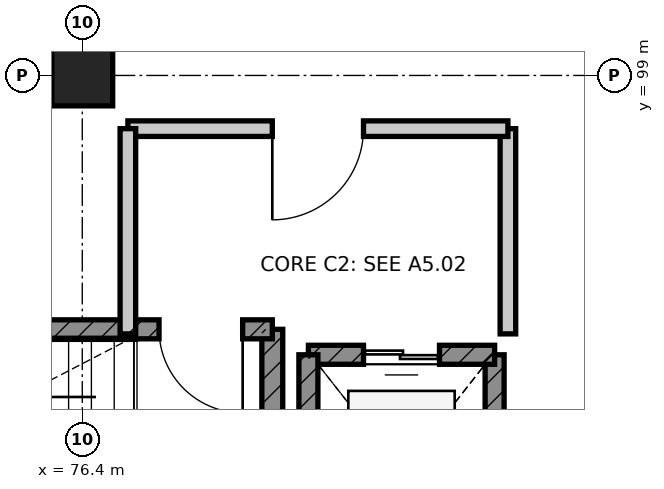
"""IFC4 building model, lengths in metres.
Left out: names, types, materials, properties, quantities, classifications, styles, units other than length and angle.
Written with IfcOpenShell. Run it as: python <this file> out.ifc"""

import sys

from ifc_helpers import new_model, si_unit, direction, frame, frame_2d, origin, origin_2d, place, context, subcontext, project, spatial, rectangle, extrude, element, fill, save


model = new_model("IFC4")
c1 = context("Model", 3, precision=1e-05, world=origin(), true_north=direction((0.0, 1.0)))
c2 = subcontext(c1, "Body", "Model", "MODEL_VIEW")
j1 = project(units=[si_unit("LENGTHUNIT", "METRE"), si_unit("PLANEANGLEUNIT", "RADIAN")], contexts=[c1])
p1 = place(None, origin())
s1 = spatial("IfcSite", under=j1, at=p1, CompositionType="ELEMENT")
p2 = place(p1, origin())
s2 = spatial("IfcBuilding", under=s1, at=p2, CompositionType="ELEMENT")
p3 = place(p2, frame((0.0, 0.0, 10.5)))
s3 = spatial("IfcBuildingStorey", under=s2, at=p3, CompositionType="ELEMENT", Elevation=10.5)
p4 = place(p3, frame((76.4, 99.0, 0.0), z_axis=(0.0, 0.0, 1.0), x_axis=(1.0, 0.0, 0.0)))
e1 = element("IfcColumn", 1, at=p4, inside=s3, PredefinedType="COLUMN", context=c2, shape_type="SweptSolid", body=[
    extrude(rectangle(XDim=0.8, YDim=0.8, at=origin_2d()), origin(), (0.0, 0.0, 1.0), 4.5),
])
p5 = place(p3, frame((78.9, 92.1, 0.0), z_axis=(0.0, 0.0, 1.0), x_axis=(0.0, 1.0, 0.0)))
e2 = element("IfcWall", 2, at=p5, inside=s3, PredefinedType="SHEAR", context=c2, shape_type="SweptSolid", body=[
    extrude(rectangle(XDim=3.56, YDim=0.275, at=frame_2d((1.78, 0.0))), origin(), (0.0, 0.0, 1.0), 4.22),
])
p6 = place(p3, frame((78.9, 95.66, 0.0), z_axis=(0.0, 0.0, 1.0), x_axis=(-1.0, 0.0, 0.0)))
e3 = element("IfcWall", 3, at=p6, inside=s3, PredefinedType="SHEAR", context=c2, shape_type="SweptSolid", body=[
    extrude(rectangle(XDim=8.4, YDim=0.25, at=frame_2d((4.2, 0.0))), origin(), (0.0, 0.0, 1.0), 4.22),
])
p7 = place(p6, frame((0.39, 0.0, 0.0)))
e4 = element("IfcOpeningElement", 4, at=p7, cuts=e3, PredefinedType="OPENING", context=c2, shape_type="SweptSolid", body=[
    extrude(rectangle(XDim=1.1, YDim=2.1, at=frame_2d((0.55, 1.05))), frame((0.0, 0.135, 0.0), z_axis=(0.0, -1.0, 0.0), x_axis=(1.0, 0.0, 0.0)), (0.0, 0.0, 1.0), 0.27),
])
p8 = place(p3, frame((81.825, 92.275, 0.0), z_axis=(0.0, 0.0, 1.0), x_axis=(0.0, 1.0, 0.0)))
e5 = element("IfcWall", 5, at=p8, inside=s3, PredefinedType="SHEAR", context=c2, shape_type="SweptSolid", body=[
    extrude(rectangle(XDim=3.05, YDim=0.25, at=frame_2d((1.525, 0.0))), origin(), (0.0, 0.0, 1.0), 4.22),
])
p9 = place(p3, frame((81.825, 95.325, 0.0), z_axis=(0.0, 0.0, 1.0), x_axis=(-1.0, 0.0, 0.0)))
e6 = element("IfcWall", 6, at=p9, inside=s3, PredefinedType="SHEAR", context=c2, shape_type="SweptSolid", body=[
    extrude(rectangle(XDim=2.45, YDim=0.25, at=frame_2d((1.225, 0.0))), origin(), (0.0, 0.0, 1.0), 4.22),
])
p10 = place(p9, frame((0.725, 0.0, 0.0)))
e7 = element("IfcOpeningElement", 7, at=p10, cuts=e6, PredefinedType="OPENING", context=c2, shape_type="SweptSolid", body=[
    extrude(rectangle(XDim=1.0, YDim=2.15, at=frame_2d((0.5, 1.075))), frame((0.0, 0.135, 0.0), z_axis=(0.0, -1.0, 0.0), x_axis=(1.0, 0.0, 0.0)), (0.0, 0.0, 1.0), 0.27),
])
p11 = place(p3, frame((79.375, 95.325, 0.0), z_axis=(0.0, 0.0, 1.0), x_axis=(0.0, -1.0, 0.0)))
e8 = element("IfcWall", 8, at=p11, inside=s3, PredefinedType="SHEAR", context=c2, shape_type="SweptSolid", body=[
    extrude(rectangle(XDim=3.05, YDim=0.25, at=frame_2d((1.525, 0.0))), origin(), (0.0, 0.0, 1.0), 4.22),
])
p12 = place(p3, frame((82.0, 95.6, 0.0), z_axis=(0.0, 0.0, 1.0), x_axis=(0.0, 1.0, 0.0)))
e9 = element("IfcWall", 9, at=p12, inside=s3, PredefinedType="PARTITIONING", context=c2, shape_type="SweptSolid", body=[
    extrude(rectangle(XDim=2.7, YDim=0.205, at=frame_2d((1.35, 0.0))), origin(), (0.0, 0.0, 1.0), 4.22),
])
p13 = place(p3, frame((82.0, 98.3, 0.0), z_axis=(0.0, 0.0, 1.0), x_axis=(-1.0, 0.0, 0.0)))
e10 = element("IfcWall", 10, at=p13, inside=s3, PredefinedType="PARTITIONING", context=c2, shape_type="SweptSolid", body=[
    extrude(rectangle(XDim=5.0, YDim=0.205, at=frame_2d((2.5, 0.0))), origin(), (0.0, 0.0, 1.0), 4.22),
])
p14 = place(p13, frame((1.9, 0.0, 0.0)))
e11 = element("IfcOpeningElement", 11, at=p14, cuts=e10, PredefinedType="OPENING", context=c2, shape_type="SweptSolid", body=[
    extrude(rectangle(XDim=1.2, YDim=2.1, at=frame_2d((0.6, 1.05))), frame((0.0, 0.113, 0.0), z_axis=(0.0, -1.0, 0.0), x_axis=(1.0, 0.0, 0.0)), (0.0, 0.0, 1.0), 0.225),
])
p15 = place(p3, frame((77.0, 98.3, 0.0), z_axis=(0.0, 0.0, 1.0), x_axis=(0.0, -1.0, 0.0)))
e12 = element("IfcWall", 12, at=p15, inside=s3, PredefinedType="PARTITIONING", context=c2, shape_type="SweptSolid", body=[
    extrude(rectangle(XDim=2.7, YDim=0.205, at=frame_2d((1.35, 0.0))), origin(), (0.0, 0.0, 1.0), 4.22),
])
p16 = place(p7, origin())
e13 = element("IfcDoor", 13, at=p16, inside=s3, OperationType="SINGLE_SWING_LEFT", PredefinedType="DOOR", context=c2, shape_type="SweptSolid", body=[
    extrude(rectangle(XDim=1.1, YDim=2.1, at=frame_2d((0.55, 1.05))), frame((0.0, 0.025, 0.0), z_axis=(0.0, -1.0, 0.0), x_axis=(1.0, 0.0, 0.0)), (0.0, 0.0, 1.0), 0.05),
])
fill(e4, e13)
p17 = place(p10, origin())
e14 = element("IfcDoor", 14, at=p17, inside=s3, OperationType="DOUBLE_DOOR_SLIDING", PredefinedType="DOOR", context=c2, shape_type="SweptSolid", body=[
    extrude(rectangle(XDim=1.0, YDim=2.15, at=frame_2d((0.5, 1.075))), frame((0.0, 0.025, 0.0), z_axis=(0.0, -1.0, 0.0), x_axis=(1.0, 0.0, 0.0)), (0.0, 0.0, 1.0), 0.05),
])
fill(e7, e14)
p18 = place(p14, origin())
e15 = element("IfcDoor", 15, at=p18, inside=s3, OperationType="SINGLE_SWING_RIGHT", PredefinedType="DOOR", context=c2, shape_type="SweptSolid", body=[
    extrude(rectangle(XDim=1.2, YDim=2.1, at=frame_2d((0.6, 1.05))), frame((0.0, 0.025, 0.0), z_axis=(0.0, -1.0, 0.0), x_axis=(1.0, 0.0, 0.0)), (0.0, 0.0, 1.0), 0.05),
])
fill(e11, e15)
save(model, sys.argv[1])
